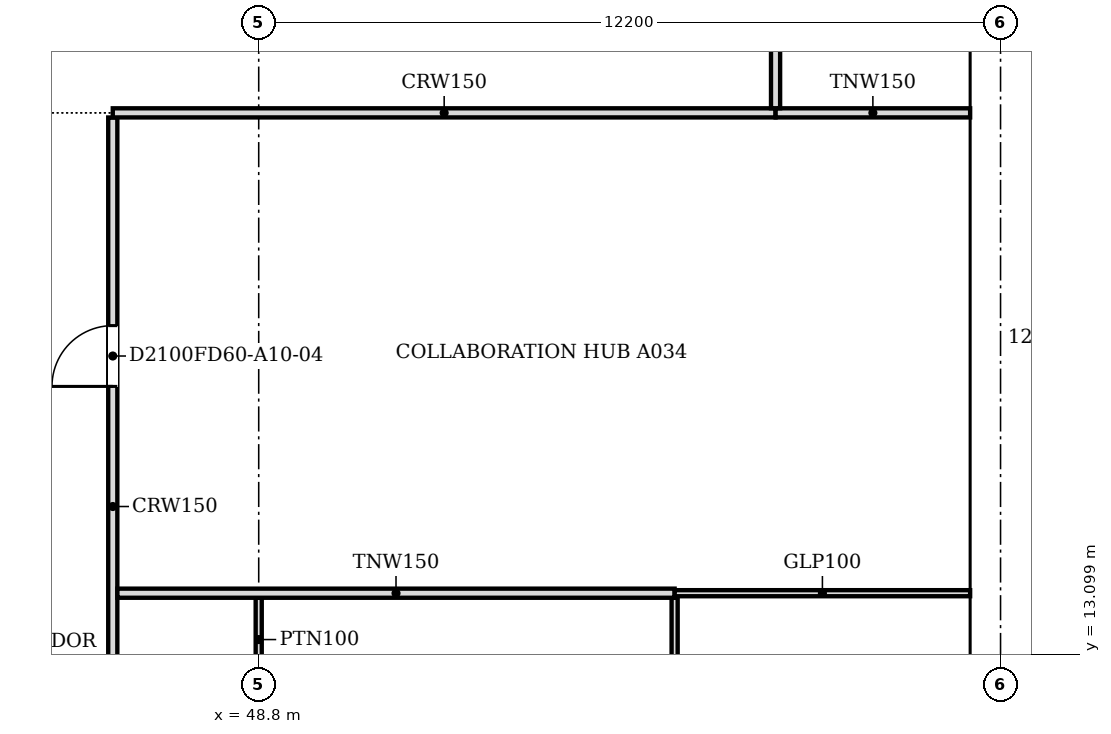
"""IFC4 building model, lengths in metres.
Left out: names, types, materials, properties, quantities, classifications, styles, units other than length and angle.
Written with IfcOpenShell. Run it as: python <this file> out.ifc"""

import sys

from ifc_helpers import new_model, si_unit, direction, frame, frame_2d, origin, place, context, subcontext, project, spatial, polyline, rectangle, outline, extrude, faceted_brep, source, transform, mapped, element, fill, save


model = new_model("IFC4")
c1 = context("Model", 3, precision=1e-05, world=origin(), true_north=direction((0.0, 1.0)))
c2 = subcontext(c1, "Body", "Model", "MODEL_VIEW")
j1 = project(units=[si_unit("LENGTHUNIT", "METRE"), si_unit("PLANEANGLEUNIT", "RADIAN")], contexts=[c1])
p1 = place(None, origin())
s1 = spatial("IfcSite", under=j1, at=p1, CompositionType="ELEMENT")
p2 = place(p1, origin())
s2 = spatial("IfcBuilding", under=s1, at=p2, CompositionType="ELEMENT")
p3 = place(p2, frame((0.0, 0.0, 116.4)))
s3 = spatial("IfcBuildingStorey", under=s2, at=p3, CompositionType="ELEMENT", Elevation=116.4)
m1 = source(origin(), c2, "Body", "SweptSolid", [
    extrude(outline(polyline([(3.05, 0.0), (6.1, 3.8), (3.05, 7.6), (0.0, 3.8), (3.05, 0.0)])), frame((0.0, 0.25, 0.0), z_axis=(0.0, -1.0, 0.0), x_axis=(1.0, 0.0, 0.0)), (0.0, 0.0, 1.0), 0.5),
])
p4 = place(p3, frame((60.75, 9.15, -3.8), z_axis=(0.0, 0.0, 1.0), x_axis=(0.0, 1.0, 0.0)))
e1 = element("IfcWall", 1, at=p4, inside=s3, PredefinedType="SOLIDWALL", context=c2, shape_type="MappedRepresentation", body=[
    mapped(m1, transform((0.0, 0.0, 0.0), scale=1.0)),
])
m2 = source(origin(), c2, "Body", "SweptSolid", [
    extrude(outline(polyline([(3.05, 0.399), (5.78, 3.8), (3.05, 7.2), (0.321, 3.8), (3.05, 0.399)])), frame((0.0, 0.26, 0.0), z_axis=(0.0, -1.0, 0.0), x_axis=(1.0, 0.0, 0.0)), (0.0, 0.0, 1.0), 0.52),
])
p5 = place(p4, origin())
e2 = element("IfcOpeningElement", 2, at=p5, cuts=e1, PredefinedType="OPENING", context=c2, shape_type="MappedRepresentation", body=[
    mapped(m2, transform((0.0, 0.0, 0.0), scale=1.0)),
])
p6 = place(p3, frame((60.75, 15.25, -3.8), z_axis=(0.0, 0.0, 1.0), x_axis=(0.0, 1.0, 0.0)))
e3 = element("IfcWall", 3, at=p6, inside=s3, PredefinedType="SOLIDWALL", context=c2, shape_type="MappedRepresentation", body=[
    mapped(m1, transform((0.0, 0.0, 0.0), scale=1.0)),
])
p7 = place(p6, origin())
e4 = element("IfcOpeningElement", 4, at=p7, cuts=e3, PredefinedType="OPENING", context=c2, shape_type="MappedRepresentation", body=[
    mapped(m2, transform((0.0, 0.0, 0.0), scale=1.0)),
])
m3 = source(origin(), c2, "Body", "Brep", [
    faceted_brep([(3.05, -0.25, 0.0), (6.1, -0.25, 3.8), (6.1, -0.25, 3.8), (3.05, -0.25, 7.6), (0.0, -0.25, 3.8), (0.0, 0.25, 3.8), (3.05, 0.25, 7.6), (6.1, 0.25, 3.8), (6.1, 0.25, 3.8), (3.05, 0.25, 0.0)], [[[0, 1, 2, 3, 4]], [[5, 6, 7, 8, 9]], [[9, 8, 1, 0]], [[7, 6, 3, 2]], [[6, 5, 4, 3]], [[5, 9, 0, 4]], [[1, 8, 7, 2]]]),
])
p8 = place(p3, frame((60.75, 21.35, -3.8), z_axis=(0.0, 0.0, 1.0), x_axis=(0.0, 1.0, 0.0)))
e5 = element("IfcWall", 5, at=p8, inside=s3, PredefinedType="SOLIDWALL", context=c2, shape_type="MappedRepresentation", body=[
    mapped(m3, transform((0.0, 0.0, 0.0), scale=1.0)),
])
p9 = place(p8, origin())
e6 = element("IfcOpeningElement", 6, at=p9, cuts=e5, PredefinedType="OPENING", context=c2, shape_type="MappedRepresentation", body=[
    mapped(m2, transform((0.0, 0.0, 0.0), scale=1.0)),
])
p10 = place(p2, frame((0.0, 0.0, 120.2)))
s4 = spatial("IfcBuildingStorey", under=s2, at=p10, CompositionType="ELEMENT", Elevation=120.2)
m4 = source(origin(), c2, "Body", "SweptSolid", [
    extrude(outline(polyline([(3.05, 0.0), (6.1, 3.8), (3.05, 7.6), (0.0, 3.8), (3.05, 0.0)])), frame((0.0, 0.25, 0.0), z_axis=(0.0, -1.0, 0.0), x_axis=(1.0, 0.0, 0.0)), (0.0, 0.0, 1.0), 0.5),
])
p11 = place(p10, frame((60.75, 12.2, -3.8), z_axis=(0.0, 0.0, 1.0), x_axis=(0.0, 1.0, 0.0)))
e7 = element("IfcWall", 7, at=p11, inside=s4, PredefinedType="SOLIDWALL", context=c2, shape_type="MappedRepresentation", body=[
    mapped(m4, transform((0.0, 0.0, 0.0), scale=1.0)),
])
m5 = source(origin(), c2, "Body", "SweptSolid", [
    extrude(outline(polyline([(3.05, 0.399), (5.78, 3.8), (3.05, 7.201), (0.321, 3.8), (3.05, 0.399)])), frame((0.0, 0.26, 0.0), z_axis=(0.0, -1.0, 0.0), x_axis=(1.0, 0.0, 0.0)), (0.0, 0.0, 1.0), 0.52),
])
p12 = place(p11, origin())
e8 = element("IfcOpeningElement", 8, at=p12, cuts=e7, PredefinedType="OPENING", context=c2, shape_type="MappedRepresentation", body=[
    mapped(m5, transform((0.0, 0.0, 0.0), scale=1.0)),
])
m6 = source(origin(), c2, "Body", "Brep", [
    faceted_brep([(3.05, -0.25, 0.0), (6.1, -0.25, 3.8), (6.1, -0.25, 3.8), (3.05, -0.25, 7.6), (0.0, -0.25, 3.8), (0.0, 0.25, 3.8), (3.05, 0.25, 7.6), (6.1, 0.25, 3.8), (6.1, 0.25, 3.8), (3.05, 0.25, 0.0)], [[[0, 1, 2, 3, 4]], [[5, 6, 7, 8, 9]], [[9, 8, 1, 0]], [[7, 6, 3, 2]], [[6, 5, 4, 3]], [[5, 9, 0, 4]], [[1, 8, 7, 2]]]),
])
p13 = place(p10, frame((60.75, 18.3, -3.8), z_axis=(0.0, 0.0, 1.0), x_axis=(0.0, 1.0, 0.0)))
e9 = element("IfcWall", 9, at=p13, inside=s4, PredefinedType="SOLIDWALL", context=c2, shape_type="MappedRepresentation", body=[
    mapped(m6, transform((0.0, 0.0, 0.0), scale=1.0)),
])
p14 = place(p13, origin())
e10 = element("IfcOpeningElement", 10, at=p14, cuts=e9, PredefinedType="OPENING", context=c2, shape_type="MappedRepresentation", body=[
    mapped(m5, transform((0.0, 0.0, 0.0), scale=1.0)),
])
p15 = place(p3, frame((46.4, 21.924, 0.0), z_axis=(0.0, 0.0, 1.0), x_axis=(0.0, -1.0, 0.0)))
e11 = element("IfcWall", 11, at=p15, inside=s3, PredefinedType="PARTITIONING", context=c2, shape_type="SweptSolid", body=[
    extrude(rectangle(XDim=17.724, YDim=0.15, at=frame_2d((8.862, 0.0))), origin(), (0.0, 0.0, 1.0), 3.067),
])
m7 = source(origin(), c2, "Body", "SweptSolid", [
    extrude(rectangle(XDim=1.0, YDim=2.1, at=frame_2d((0.5, 1.05))), frame((0.0, 0.085, 0.0), z_axis=(0.0, -1.0, 0.0), x_axis=(1.0, 0.0, 0.0)), (0.0, 0.0, 1.0), 0.17),
])
p16 = place(p15, frame((3.423, 0.0, 0.0)))
e12 = element("IfcOpeningElement", 12, at=p16, cuts=e11, PredefinedType="OPENING", context=c2, shape_type="MappedRepresentation", body=[
    mapped(m7, transform((0.0, 0.0, 0.0), scale=1.0)),
])
m8 = source(origin(), c2, "Body", "SweptSolid", [
    extrude(rectangle(XDim=0.9, YDim=2.1, at=frame_2d((0.45, 1.05))), frame((0.0, 0.085, 0.0), z_axis=(0.0, -1.0, 0.0), x_axis=(1.0, 0.0, 0.0)), (0.0, 0.0, 1.0), 0.17),
])
p17 = place(p15, frame((12.324, 0.0, 0.0)))
e13 = element("IfcOpeningElement", 13, at=p17, cuts=e11, PredefinedType="OPENING", context=c2, shape_type="MappedRepresentation", body=[
    mapped(m8, transform((0.0, 0.0, 0.0), scale=1.0)),
])
p18 = place(p3, frame((55.64, 14.024, 0.0), z_axis=(0.0, 0.0, 1.0), x_axis=(0.0, -1.0, 0.0)))
e14 = element("IfcWall", 14, at=p18, inside=s3, PredefinedType="PARTITIONING", context=c2, shape_type="SweptSolid", body=[
    extrude(rectangle(XDim=5.924, YDim=0.1, at=frame_2d((2.962, 0.0))), origin(), (0.0, 0.0, 1.0), 3.067),
])
m9 = source(origin(), c2, "Body", "SweptSolid", [
    extrude(rectangle(XDim=0.9, YDim=2.1, at=frame_2d((0.45, 1.05))), frame((0.0, 0.06, 0.0), z_axis=(0.0, -1.0, 0.0), x_axis=(1.0, 0.0, 0.0)), (0.0, 0.0, 1.0), 0.12),
])
p19 = place(p18, frame((2.524, 0.0, 0.0)))
e15 = element("IfcOpeningElement", 15, at=p19, cuts=e14, PredefinedType="OPENING", context=c2, shape_type="MappedRepresentation", body=[
    mapped(m9, transform((0.0, 0.0, 0.0), scale=1.0)),
])
p20 = place(p3, frame((48.8, 12.65, 0.0), z_axis=(0.0, 0.0, 1.0), x_axis=(0.0, 1.0, 0.0)))
e16 = element("IfcWall", 16, at=p20, inside=s3, PredefinedType="PARTITIONING", context=c2, shape_type="SweptSolid", body=[
    extrude(rectangle(XDim=1.375, YDim=0.1, at=frame_2d((0.688, 0.0))), origin(), (0.0, 0.0, 1.0), 3.067),
])
p21 = place(p3, frame((46.476, 14.1, 0.0), z_axis=(0.0, 0.0, 1.0), x_axis=(1.0, 0.0, 0.0)))
e17 = element("IfcWall", 17, at=p21, inside=s3, PredefinedType="PARTITIONING", context=c2, shape_type="SweptSolid", body=[
    extrude(rectangle(XDim=9.164, YDim=0.15, at=frame_2d((4.582, 0.0))), origin(), (0.0, 0.0, 1.0), 3.067),
])
p22 = place(p3, frame((55.641, 14.1, 0.0), z_axis=(0.0, 0.0, 1.0), x_axis=(1.0, 0.0, 0.0)))
e18 = element("IfcWall", 18, at=p22, inside=s3, PredefinedType="PARTITIONING", context=c2, shape_type="SweptSolid", body=[
    extrude(rectangle(XDim=4.859, YDim=0.1, at=frame_2d((2.429, 0.0))), origin(), (0.0, 0.0, 1.0), 3.067),
])
p23 = place(p3, frame((46.4, 22.0, 0.0), z_axis=(0.0, 0.0, 1.0), x_axis=(1.0, 0.0, 0.0)))
e19 = element("IfcWall", 19, at=p23, inside=s3, PredefinedType="PARTITIONING", context=c2, shape_type="SweptSolid", body=[
    extrude(rectangle(XDim=10.9, YDim=0.15, at=frame_2d((5.45, 0.0))), origin(), (0.0, 0.0, 1.0), 3.067),
])
p24 = place(p3, frame((57.301, 22.0, 0.0), z_axis=(0.0, 0.0, 1.0), x_axis=(1.0, 0.0, 0.0)))
e20 = element("IfcWall", 20, at=p24, inside=s3, PredefinedType="PARTITIONING", context=c2, shape_type="SweptSolid", body=[
    extrude(rectangle(XDim=3.199, YDim=0.15, at=frame_2d((1.6, 0.0))), origin(), (0.0, 0.0, 1.0), 3.067),
])
p25 = place(p3, frame((57.3, 30.6, 0.0), z_axis=(0.0, 0.0, 1.0), x_axis=(0.0, -1.0, 0.0)))
e21 = element("IfcWall", 21, at=p25, inside=s3, PredefinedType="PARTITIONING", context=c2, shape_type="SweptSolid", body=[
    extrude(rectangle(XDim=8.524, YDim=0.15, at=frame_2d((4.262, 0.0))), origin(), (0.0, 0.0, 1.0), 3.067),
])
p26 = place(p25, frame((3.824, 0.0, 0.0)))
e22 = element("IfcOpeningElement", 22, at=p26, cuts=e21, PredefinedType="OPENING", context=c2, shape_type="MappedRepresentation", body=[
    mapped(m8, transform((0.0, 0.0, 0.0), scale=1.0)),
])
m10 = source(origin(), c2, "Body", "SweptSolid", [
    extrude(rectangle(XDim=1.0, YDim=2.1, at=frame_2d((0.5, 1.05))), frame((0.0, 0.025, 0.0), z_axis=(0.0, -1.0, 0.0), x_axis=(1.0, 0.0, 0.0)), (0.0, 0.0, 1.0), 0.05),
])
p27 = place(p16, origin())
e23 = element("IfcDoor", 23, at=p27, inside=s3, OperationType="SINGLE_SWING_RIGHT", PredefinedType="DOOR", context=c2, shape_type="MappedRepresentation", body=[
    mapped(m10, transform((0.0, 0.0, 0.0), scale=1.0)),
])
fill(e12, e23)
save(model, sys.argv[1])
